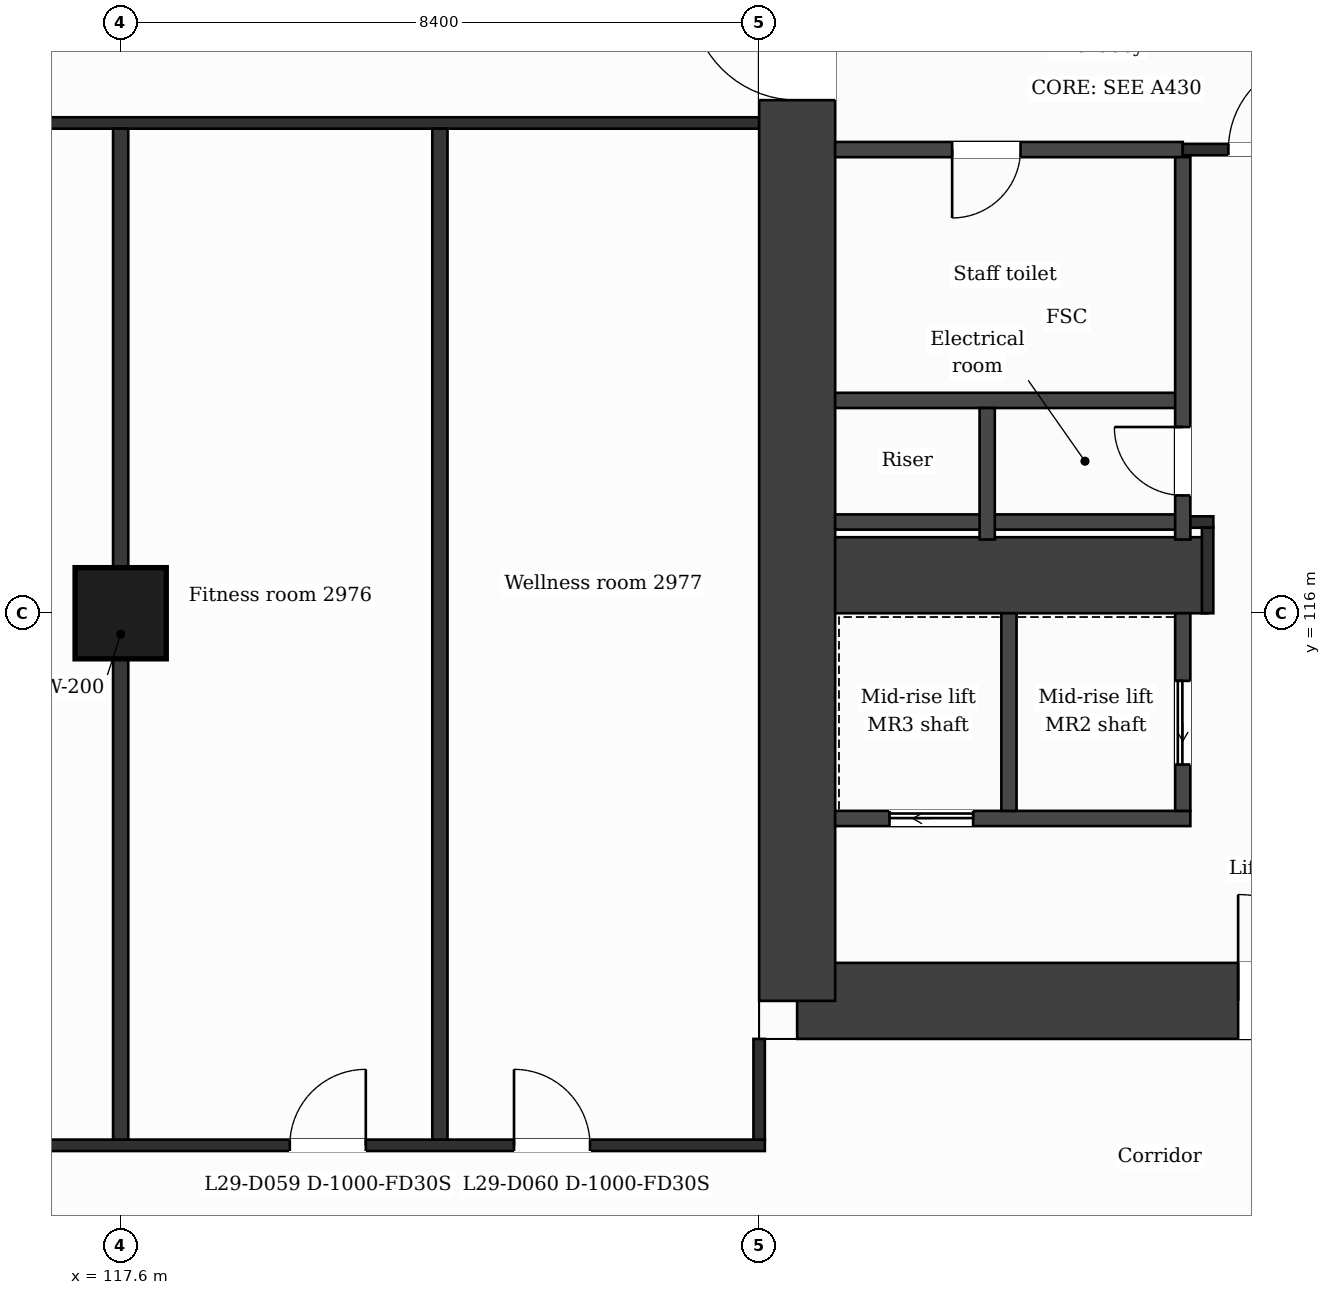
"""IFC4 building model, lengths in metres.
Left out: names, types, materials, properties, quantities, classifications, styles, units other than length and angle.
Written with IfcOpenShell. Run it as: python <this file> out.ifc"""

import sys

from ifc_helpers import new_model, si_unit, direction, frame, frame_2d, origin, origin_2d, place, context, subcontext, project, spatial, rectangle, extrude, element, fill, save


model = new_model("IFC4")
c1 = context("Model", 3, precision=1e-05, world=origin(), true_north=direction((0.0, 1.0)))
c2 = subcontext(c1, "Body", "Model", "MODEL_VIEW")
j1 = project(units=[si_unit("LENGTHUNIT", "METRE"), si_unit("PLANEANGLEUNIT", "RADIAN")], contexts=[c1])
p1 = place(None, origin())
s1 = spatial("IfcSite", under=j1, at=p1, CompositionType="ELEMENT")
p2 = place(p1, origin())
s2 = spatial("IfcBuilding", under=s1, at=p2, CompositionType="ELEMENT")
p3 = place(p2, frame((0.0, 0.0, 124.3)))
s3 = spatial("IfcBuildingStorey", under=s2, at=p3, CompositionType="ELEMENT", Elevation=124.3)
p4 = place(p3, frame((140.559, 110.9, 0.0), z_axis=(0.0, 0.0, 1.0), x_axis=(-1.0, 0.0, 0.0)))
e1 = element("IfcWall", 1, at=p4, inside=s3, PredefinedType="SHEAR", context=c2, shape_type="SweptSolid", body=[
    extrude(rectangle(XDim=14.059, YDim=1.0, at=frame_2d((7.029, 0.0))), origin(), (0.0, 0.0, 1.0), 3.7),
])
p5 = place(p4, frame((6.858, 0.0, 0.0)))
e2 = element("IfcOpeningElement", 2, at=p5, cuts=e1, PredefinedType="OPENING", context=c2, shape_type="SweptSolid", body=[
    extrude(rectangle(XDim=1.4, YDim=2.1, at=frame_2d((0.7, 1.05))), frame((0.0, 0.51, 0.0), z_axis=(0.0, -1.0, 0.0), x_axis=(1.0, 0.0, 0.0)), (0.0, 0.0, 1.0), 1.02),
])
p6 = place(p3, frame((126.5, 110.9, 0.0), z_axis=(0.0, 0.0, 1.0), x_axis=(0.0, 1.0, 0.0)))
e3 = element("IfcWall", 3, at=p6, inside=s3, PredefinedType="SHEAR", context=c2, shape_type="SweptSolid", body=[
    extrude(rectangle(XDim=21.0, YDim=1.0, at=frame_2d((10.5, 0.0))), origin(), (0.0, 0.0, 1.0), 3.7),
])
p7 = place(p6, frame((11.85, 0.0, 0.0)))
e4 = element("IfcOpeningElement", 4, at=p7, cuts=e3, PredefinedType="OPENING", context=c2, shape_type="SweptSolid", body=[
    extrude(rectangle(XDim=1.4, YDim=2.1, at=frame_2d((0.7, 1.05))), frame((0.0, 0.51, 0.0), z_axis=(0.0, -1.0, 0.0), x_axis=(1.0, 0.0, 0.0)), (0.0, 0.0, 1.0), 1.02),
])
p8 = place(p3, frame((127.0, 116.5, 0.0), z_axis=(0.0, 0.0, 1.0), x_axis=(1.0, 0.0, 0.0)))
e5 = element("IfcWall", 5, at=p8, inside=s3, PredefinedType="SHEAR", context=c2, shape_type="SweptSolid", body=[
    extrude(rectangle(XDim=4.9, YDim=1.0, at=frame_2d((2.45, 0.0))), origin(), (0.0, 0.0, 1.0), 3.7),
])
p9 = place(p3, frame((117.6, 116.0, 0.0), z_axis=(0.0, 0.0, 1.0), x_axis=(1.0, 0.0, 0.0)))
e6 = element("IfcColumn", 6, at=p9, inside=s3, PredefinedType="COLUMN", context=c2, shape_type="SweptSolid", body=[
    extrude(rectangle(XDim=1.2, YDim=1.2, at=origin_2d()), origin(), (0.0, 0.0, 1.0), 3.7),
])
p10 = place(p3, frame((100.725, 109.0, 0.0), z_axis=(0.0, 0.0, 1.0), x_axis=(1.0, 0.0, 0.0)))
e7 = element("IfcWall", 7, at=p10, inside=s3, PredefinedType="PARTITIONING", context=c2, shape_type="SweptSolid", body=[
    extrude(rectangle(XDim=25.35, YDim=0.15, at=frame_2d((12.675, 0.0))), origin(), (0.0, 0.0, 1.0), 3.38),
])
p11 = place(p10, frame((1.925, 0.0, 0.0)))
e8 = element("IfcOpeningElement", 8, at=p11, cuts=e7, PredefinedType="OPENING", context=c2, shape_type="SweptSolid", body=[
    extrude(rectangle(XDim=1.0, YDim=2.1, at=frame_2d((0.5, 1.05))), frame((0.0, 0.085, 0.0), z_axis=(0.0, -1.0, 0.0), x_axis=(1.0, 0.0, 0.0)), (0.0, 0.0, 1.0), 0.17),
])
p12 = place(p10, frame((6.125, 0.0, 0.0)))
e9 = element("IfcOpeningElement", 9, at=p12, cuts=e7, PredefinedType="OPENING", context=c2, shape_type="SweptSolid", body=[
    extrude(rectangle(XDim=1.0, YDim=2.1, at=frame_2d((0.5, 1.05))), frame((0.0, 0.085, 0.0), z_axis=(0.0, -1.0, 0.0), x_axis=(1.0, 0.0, 0.0)), (0.0, 0.0, 1.0), 0.17),
])
p13 = place(p10, frame((12.175, 0.0, 0.0)))
e10 = element("IfcOpeningElement", 10, at=p13, cuts=e7, PredefinedType="OPENING", context=c2, shape_type="SweptSolid", body=[
    extrude(rectangle(XDim=1.0, YDim=2.1, at=frame_2d((0.5, 1.05))), frame((0.0, 0.085, 0.0), z_axis=(0.0, -1.0, 0.0), x_axis=(1.0, 0.0, 0.0)), (0.0, 0.0, 1.0), 0.17),
])
p14 = place(p10, frame((19.1, 0.0, 0.0)))
e11 = element("IfcOpeningElement", 11, at=p14, cuts=e7, PredefinedType="OPENING", context=c2, shape_type="SweptSolid", body=[
    extrude(rectangle(XDim=1.0, YDim=2.1, at=frame_2d((0.5, 1.05))), frame((0.0, 0.085, 0.0), z_axis=(0.0, -1.0, 0.0), x_axis=(1.0, 0.0, 0.0)), (0.0, 0.0, 1.0), 0.17),
])
p15 = place(p10, frame((22.05, 0.0, 0.0)))
e12 = element("IfcOpeningElement", 12, at=p15, cuts=e7, PredefinedType="OPENING", context=c2, shape_type="SweptSolid", body=[
    extrude(rectangle(XDim=1.0, YDim=2.1, at=frame_2d((0.5, 1.05))), frame((0.0, 0.085, 0.0), z_axis=(0.0, -1.0, 0.0), x_axis=(1.0, 0.0, 0.0)), (0.0, 0.0, 1.0), 0.17),
])
p16 = place(p3, frame((127.0, 113.3, 0.0), z_axis=(0.0, 0.0, 1.0), x_axis=(1.0, 0.0, 0.0)))
e13 = element("IfcWall", 13, at=p16, inside=s3, PredefinedType="PARTITIONING", context=c2, shape_type="SweptSolid", body=[
    extrude(rectangle(XDim=4.673, YDim=0.2, at=frame_2d((2.336, 0.0))), origin(), (0.0, 0.0, 1.0), 3.38),
])
p17 = place(p16, frame((0.715, 0.0, 0.0)))
e14 = element("IfcOpeningElement", 14, at=p17, cuts=e13, PredefinedType="OPENING", context=c2, shape_type="SweptSolid", body=[
    extrude(rectangle(XDim=1.1, YDim=2.1, at=frame_2d((0.55, 1.05))), frame((0.0, 0.11, 0.0), z_axis=(0.0, -1.0, 0.0), x_axis=(1.0, 0.0, 0.0)), (0.0, 0.0, 1.0), 0.22),
])
p18 = place(p3, frame((127.0, 117.2, 0.0), z_axis=(0.0, 0.0, 1.0), x_axis=(1.0, 0.0, 0.0)))
e15 = element("IfcWall", 15, at=p18, inside=s3, PredefinedType="PARTITIONING", context=c2, shape_type="SweptSolid", body=[
    extrude(rectangle(XDim=4.573, YDim=0.2, at=frame_2d((2.287, 0.0))), origin(), (0.0, 0.0, 1.0), 3.38),
])
p19 = place(p3, frame((131.573, 117.2, 0.0), z_axis=(0.0, 0.0, 1.0), x_axis=(1.0, 0.0, 0.0)))
e16 = element("IfcWall", 16, at=p19, inside=s3, PredefinedType="PARTITIONING", context=c2, shape_type="SweptSolid", body=[
    extrude(rectangle(XDim=0.402, YDim=0.15, at=frame_2d((0.201, 0.0))), origin(), (0.0, 0.0, 1.0), 3.38),
])
p20 = place(p3, frame((127.0, 118.8, 0.0), z_axis=(0.0, 0.0, 1.0), x_axis=(1.0, 0.0, 0.0)))
e17 = element("IfcWall", 17, at=p20, inside=s3, PredefinedType="PARTITIONING", context=c2, shape_type="SweptSolid", body=[
    extrude(rectangle(XDim=4.573, YDim=0.2, at=frame_2d((2.287, 0.0))), origin(), (0.0, 0.0, 1.0), 3.38),
])
p21 = place(p3, frame((127.0, 122.1, 0.0), z_axis=(0.0, 0.0, 1.0), x_axis=(1.0, 0.0, 0.0)))
e18 = element("IfcWall", 18, at=p21, inside=s3, PredefinedType="PARTITIONING", context=c2, shape_type="SweptSolid", body=[
    extrude(rectangle(XDim=4.573, YDim=0.2, at=frame_2d((2.287, 0.0))), origin(), (0.0, 0.0, 1.0), 3.38),
])
p22 = place(p21, frame((1.539, 0.0, 0.0)))
e19 = element("IfcOpeningElement", 19, at=p22, cuts=e18, PredefinedType="OPENING", context=c2, shape_type="SweptSolid", body=[
    extrude(rectangle(XDim=0.9, YDim=2.1, at=frame_2d((0.45, 1.05))), frame((0.0, 0.11, 0.0), z_axis=(0.0, -1.0, 0.0), x_axis=(1.0, 0.0, 0.0)), (0.0, 0.0, 1.0), 0.22),
])
p23 = place(p3, frame((131.573, 122.1, 0.0), z_axis=(0.0, 0.0, 1.0), x_axis=(1.0, 0.0, 0.0)))
e20 = element("IfcWall", 20, at=p23, inside=s3, PredefinedType="PARTITIONING", context=c2, shape_type="SweptSolid", body=[
    extrude(rectangle(XDim=2.4, YDim=0.15, at=frame_2d((1.2, 0.0))), origin(), (0.0, 0.0, 1.0), 3.38),
])
p24 = place(p23, frame((0.6, 0.0, 0.0)))
e21 = element("IfcOpeningElement", 21, at=p24, cuts=e20, PredefinedType="OPENING", context=c2, shape_type="SweptSolid", body=[
    extrude(rectangle(XDim=1.2, YDim=2.1, at=frame_2d((0.6, 1.05))), frame((0.0, 0.085, 0.0), z_axis=(0.0, -1.0, 0.0), x_axis=(1.0, 0.0, 0.0)), (0.0, 0.0, 1.0), 0.17),
])
p25 = place(p3, frame((100.8, 122.45, 0.0), z_axis=(0.0, 0.0, 1.0), x_axis=(1.0, 0.0, 0.0)))
e22 = element("IfcWall", 22, at=p25, inside=s3, PredefinedType="PARTITIONING", context=c2, shape_type="SweptSolid", body=[
    extrude(rectangle(XDim=25.2, YDim=0.15, at=frame_2d((12.6, 0.0))), origin(), (0.0, 0.0, 1.0), 3.38),
])
for number, where, z_axis, x_axis in (
    (23, (117.6, 109.075, 0.0), (0.0, 0.0, 1.0), (0.0, 1.0, 0.0)),
    (24, (121.8, 109.075, 0.0), (0.0, 0.0, 1.0), (0.0, 1.0, 0.0)),
):
    element("IfcWall", number, at=place(p3, frame(where, z_axis=z_axis, x_axis=x_axis)), inside=s3, PredefinedType="PARTITIONING", context=c2, shape_type="SweptSolid", body=[
        extrude(rectangle(XDim=13.3, YDim=0.2, at=frame_2d((6.65, 0.0))), origin(), (0.0, 0.0, 1.0), 3.38),
    ])
p26 = place(p3, frame((126.0, 109.075, 0.0), z_axis=(0.0, 0.0, 1.0), x_axis=(0.0, 1.0, 0.0)))
e25 = element("IfcWall", 25, at=p26, inside=s3, PredefinedType="PARTITIONING", context=c2, shape_type="SweptSolid", body=[
    extrude(rectangle(XDim=1.325, YDim=0.15, at=frame_2d((0.663, 0.0))), origin(), (0.0, 0.0, 1.0), 3.38),
])
p27 = place(p3, frame((129.0, 116.97, 0.0), z_axis=(0.0, 0.0, 1.0), x_axis=(0.0, 1.0, 0.0)))
e26 = element("IfcWall", 26, at=p27, inside=s3, PredefinedType="PARTITIONING", context=c2, shape_type="SweptSolid", body=[
    extrude(rectangle(XDim=1.73, YDim=0.2, at=frame_2d((0.865, 0.0))), origin(), (0.0, 0.0, 1.0), 3.38),
])
p28 = place(p3, frame((129.287, 113.4, 0.0), z_axis=(0.0, 0.0, 1.0), x_axis=(0.0, 1.0, 0.0)))
e27 = element("IfcWall", 27, at=p28, inside=s3, PredefinedType="PARTITIONING", context=c2, shape_type="SweptSolid", body=[
    extrude(rectangle(XDim=2.6, YDim=0.2, at=frame_2d((1.3, 0.0))), origin(), (0.0, 0.0, 1.0), 3.38),
])
p29 = place(p3, frame((131.573, 113.4, 0.0), z_axis=(0.0, 0.0, 1.0), x_axis=(0.0, 1.0, 0.0)))
e28 = element("IfcWall", 28, at=p29, inside=s3, PredefinedType="PARTITIONING", context=c2, shape_type="SweptSolid", body=[
    extrude(rectangle(XDim=2.6, YDim=0.2, at=frame_2d((1.3, 0.0))), origin(), (0.0, 0.0, 1.0), 3.38),
])
p30 = place(p29, frame((0.61, 0.0, 0.0)))
e29 = element("IfcOpeningElement", 29, at=p30, cuts=e28, PredefinedType="OPENING", context=c2, shape_type="SweptSolid", body=[
    extrude(rectangle(XDim=1.1, YDim=2.1, at=frame_2d((0.55, 1.05))), frame((0.0, 0.11, 0.0), z_axis=(0.0, -1.0, 0.0), x_axis=(1.0, 0.0, 0.0)), (0.0, 0.0, 1.0), 0.22),
])
p31 = place(p3, frame((131.573, 116.97, 0.0), z_axis=(0.0, 0.0, 1.0), x_axis=(0.0, 1.0, 0.0)))
e30 = element("IfcWall", 30, at=p31, inside=s3, PredefinedType="PARTITIONING", context=c2, shape_type="SweptSolid", body=[
    extrude(rectangle(XDim=5.03, YDim=0.2, at=frame_2d((2.515, 0.0))), origin(), (0.0, 0.0, 1.0), 3.38),
])
p32 = place(p31, frame((0.58, 0.0, 0.0)))
e31 = element("IfcOpeningElement", 31, at=p32, cuts=e30, PredefinedType="OPENING", context=c2, shape_type="SweptSolid", body=[
    extrude(rectangle(XDim=0.9, YDim=2.1, at=frame_2d((0.45, 1.05))), frame((0.0, 0.11, 0.0), z_axis=(0.0, -1.0, 0.0), x_axis=(1.0, 0.0, 0.0)), (0.0, 0.0, 1.0), 0.22),
])
p33 = place(p3, frame((131.9, 116.0, 0.0), z_axis=(0.0, 0.0, 1.0), x_axis=(0.0, 1.0, 0.0)))
e32 = element("IfcWall", 32, at=p33, inside=s3, PredefinedType="PARTITIONING", context=c2, shape_type="SweptSolid", body=[
    extrude(rectangle(XDim=1.125, YDim=0.15, at=frame_2d((0.562, 0.0))), origin(), (0.0, 0.0, 1.0), 3.38),
])
p34 = place(p24, origin())
e33 = element("IfcDoor", 33, at=p34, inside=s3, OperationType="SINGLE_SWING_RIGHT", PredefinedType="DOOR", context=c2, shape_type="SweptSolid", body=[
    extrude(rectangle(XDim=1.2, YDim=2.1, at=frame_2d((0.6, 1.05))), frame((0.0, 0.025, 0.0), z_axis=(0.0, -1.0, 0.0), x_axis=(1.0, 0.0, 0.0)), (0.0, 0.0, 1.0), 0.05),
])
fill(e21, e33)
p35 = place(p22, origin())
e34 = element("IfcDoor", 34, at=p35, inside=s3, OperationType="SINGLE_SWING_LEFT", PredefinedType="DOOR", context=c2, shape_type="SweptSolid", body=[
    extrude(rectangle(XDim=0.9, YDim=2.1, at=frame_2d((0.45, 1.05))), frame((0.0, 0.025, 0.0), z_axis=(0.0, -1.0, 0.0), x_axis=(1.0, 0.0, 0.0)), (0.0, 0.0, 1.0), 0.05),
])
fill(e19, e34)
p36 = place(p32, origin())
e35 = element("IfcDoor", 35, at=p36, inside=s3, OperationType="SINGLE_SWING_RIGHT", PredefinedType="DOOR", context=c2, shape_type="SweptSolid", body=[
    extrude(rectangle(XDim=0.9, YDim=2.1, at=frame_2d((0.45, 1.05))), frame((0.0, 0.025, 0.0), z_axis=(0.0, -1.0, 0.0), x_axis=(1.0, 0.0, 0.0)), (0.0, 0.0, 1.0), 0.05),
])
fill(e31, e35)
p37 = place(p30, origin())
e36 = element("IfcDoor", 36, at=p37, inside=s3, OperationType="SLIDING_TO_LEFT", PredefinedType="DOOR", context=c2, shape_type="SweptSolid", body=[
    extrude(rectangle(XDim=1.1, YDim=2.1, at=frame_2d((0.55, 1.05))), frame((0.0, 0.025, 0.0), z_axis=(0.0, -1.0, 0.0), x_axis=(1.0, 0.0, 0.0)), (0.0, 0.0, 1.0), 0.05),
])
fill(e29, e36)
p38 = place(p17, origin())
e37 = element("IfcDoor", 37, at=p38, inside=s3, OperationType="SLIDING_TO_LEFT", PredefinedType="DOOR", context=c2, shape_type="SweptSolid", body=[
    extrude(rectangle(XDim=1.1, YDim=2.1, at=frame_2d((0.55, 1.05))), frame((0.0, 0.025, 0.0), z_axis=(0.0, -1.0, 0.0), x_axis=(1.0, 0.0, 0.0)), (0.0, 0.0, 1.0), 0.05),
])
fill(e14, e37)
p39 = place(p14, origin())
e38 = element("IfcDoor", 38, at=p39, inside=s3, OperationType="SINGLE_SWING_RIGHT", PredefinedType="DOOR", context=c2, shape_type="SweptSolid", body=[
    extrude(rectangle(XDim=1.0, YDim=2.1, at=frame_2d((0.5, 1.05))), frame((0.0, 0.025, 0.0), z_axis=(0.0, -1.0, 0.0), x_axis=(1.0, 0.0, 0.0)), (0.0, 0.0, 1.0), 0.05),
])
fill(e11, e38)
p40 = place(p15, origin())
e39 = element("IfcDoor", 39, at=p40, inside=s3, OperationType="SINGLE_SWING_LEFT", PredefinedType="DOOR", context=c2, shape_type="SweptSolid", body=[
    extrude(rectangle(XDim=1.0, YDim=2.1, at=frame_2d((0.5, 1.05))), frame((0.0, 0.025, 0.0), z_axis=(0.0, -1.0, 0.0), x_axis=(1.0, 0.0, 0.0)), (0.0, 0.0, 1.0), 0.05),
])
fill(e12, e39)
p41 = place(p5, origin())
e40 = element("IfcDoor", 40, at=p41, inside=s3, OperationType="SINGLE_SWING_RIGHT", PredefinedType="DOOR", context=c2, shape_type="SweptSolid", body=[
    extrude(rectangle(XDim=1.4, YDim=2.1, at=frame_2d((0.7, 1.05))), frame((0.0, 0.025, 0.0), z_axis=(0.0, -1.0, 0.0), x_axis=(1.0, 0.0, 0.0)), (0.0, 0.0, 1.0), 0.05),
])
fill(e2, e40)
p42 = place(p7, origin())
e41 = element("IfcDoor", 41, at=p42, inside=s3, OperationType="SINGLE_SWING_RIGHT", PredefinedType="DOOR", context=c2, shape_type="SweptSolid", body=[
    extrude(rectangle(XDim=1.4, YDim=2.1, at=frame_2d((0.7, 1.05))), frame((0.0, 0.025, 0.0), z_axis=(0.0, -1.0, 0.0), x_axis=(1.0, 0.0, 0.0)), (0.0, 0.0, 1.0), 0.05),
])
fill(e4, e41)
save(model, sys.argv[1])
